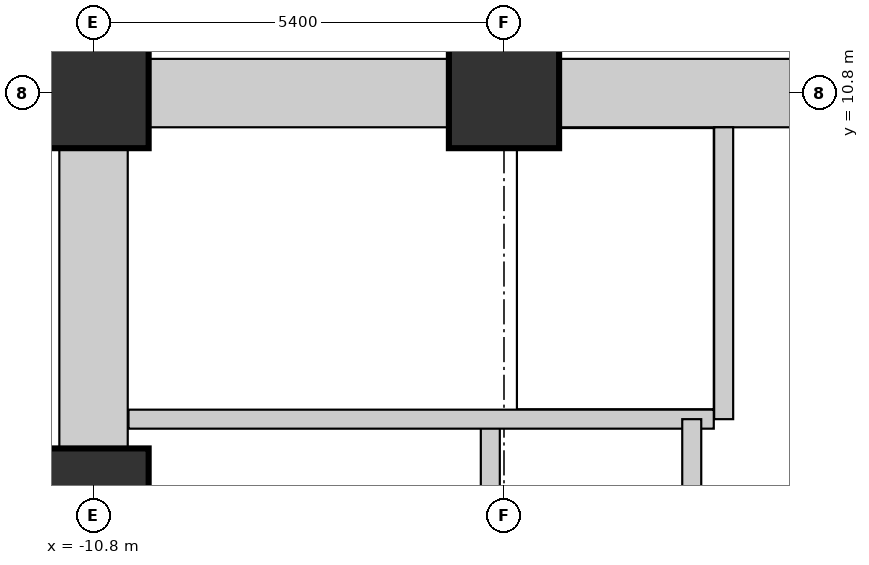
"""IFC4 building model, lengths in metres.
Left out: names, types, materials, properties, quantities, classifications, styles, units other than length and angle.
Written with IfcOpenShell. Run it as: python <this file> out.ifc"""

import sys

from ifc_helpers import new_model, si_unit, direction, frame, frame_2d, origin, origin_2d, place, context, subcontext, project, spatial, rectangle, extrude, element, fill, save


model = new_model("IFC4")
c1 = context("Model", 3, precision=1e-05, world=origin(), true_north=direction((0.0, 1.0)))
c2 = subcontext(c1, "Body", "Model", "MODEL_VIEW")
j1 = project(units=[si_unit("LENGTHUNIT", "METRE"), si_unit("PLANEANGLEUNIT", "RADIAN")], contexts=[c1])
p1 = place(None, origin())
s1 = spatial("IfcSite", under=j1, at=p1, CompositionType="ELEMENT")
p2 = place(p1, origin())
s2 = spatial("IfcBuilding", under=s1, at=p2, CompositionType="ELEMENT")
p3 = place(p2, origin())
s3 = spatial("IfcBuildingStorey", under=s2, at=p3, CompositionType="ELEMENT", Elevation=0.0)
for number, where, z_axis, x_axis in (
    (1, (-10.8, 5.4, 0.0), (0.0, 0.0, 1.0), (1.0, 0.0, 0.0)),
    (2, (-10.8, 10.8, 0.0), (0.0, 0.0, 1.0), (1.0, 0.0, 0.0)),
    (3, (-5.4, 10.8, 0.0), (0.0, 0.0, 1.0), (1.0, 0.0, 0.0)),
):
    element("IfcColumn", number, at=place(p3, frame(where, z_axis=z_axis, x_axis=x_axis)), inside=s3, PredefinedType="COLUMN", context=c2, shape_type="SweptSolid", body=[
        extrude(rectangle(XDim=1.45, YDim=1.45, at=origin_2d()), origin(), (0.0, 0.0, 1.0), 4.5),
    ])
p4 = place(p3, frame((-10.065, 10.8, 0.0), z_axis=(0.0, 0.0, 1.0), x_axis=(1.0, 0.0, 0.0)))
e4 = element("IfcWall", 4, at=p4, inside=s3, PredefinedType="SHEAR", context=c2, shape_type="SweptSolid", body=[
    extrude(rectangle(XDim=3.93, YDim=0.9, at=frame_2d((1.965, 0.0))), origin(), (0.0, 0.0, 1.0), 4.5),
])
p5 = place(p3, frame((-4.665, 10.8, 0.0), z_axis=(0.0, 0.0, 1.0), x_axis=(1.0, 0.0, 0.0)))
e5 = element("IfcWall", 5, at=p5, inside=s3, PredefinedType="SHEAR", context=c2, shape_type="SweptSolid", body=[
    extrude(rectangle(XDim=3.93, YDim=0.9, at=frame_2d((1.965, 0.0))), origin(), (0.0, 0.0, 1.0), 4.5),
])
p6 = place(p5, frame((2.58, 0.0, 0.0)))
e6 = element("IfcOpeningElement", 6, at=p6, cuts=e5, PredefinedType="OPENING", context=c2, shape_type="SweptSolid", body=[
    extrude(rectangle(XDim=1.1, YDim=2.1, at=frame_2d((0.55, 1.05))), frame((0.0, 0.46, 0.0), z_axis=(0.0, -1.0, 0.0), x_axis=(1.0, 0.0, 0.0)), (0.0, 0.0, 1.0), 0.92),
])
p7 = place(p3, frame((-10.8, 6.135, 0.0), z_axis=(0.0, 0.0, 1.0), x_axis=(0.0, 1.0, 0.0)))
e7 = element("IfcWall", 7, at=p7, inside=s3, PredefinedType="SHEAR", context=c2, shape_type="SweptSolid", body=[
    extrude(rectangle(XDim=3.93, YDim=0.9, at=frame_2d((1.965, 0.0))), origin(), (0.0, 0.0, 1.0), 4.5),
])
p8 = place(p3, frame((-5.58, 0.72, 0.0), z_axis=(0.0, 0.0, 1.0), x_axis=(0.0, 1.0, 0.0)))
e8 = element("IfcWall", 8, at=p8, inside=s3, PredefinedType="SHEAR", context=c2, shape_type="SweptSolid", body=[
    extrude(rectangle(XDim=5.79, YDim=0.25, at=frame_2d((2.895, 0.0))), origin(), (0.0, 0.0, 1.0), 4.5),
])
p9 = place(p8, frame((3.35, 0.0, 0.0)))
e9 = element("IfcOpeningElement", 9, at=p9, cuts=e8, PredefinedType="OPENING", context=c2, shape_type="SweptSolid", body=[
    extrude(rectangle(XDim=1.1, YDim=2.1, at=frame_2d((0.55, 1.05))), frame((0.0, 0.135, 0.0), z_axis=(0.0, -1.0, 0.0), x_axis=(1.0, 0.0, 0.0)), (0.0, 0.0, 1.0), 0.27),
])
p10 = place(p3, frame((-2.51, 6.51, 0.0), z_axis=(0.0, 0.0, 1.0), x_axis=(0.0, 1.0, 0.0)))
e10 = element("IfcWall", 10, at=p10, inside=s3, PredefinedType="SHEAR", context=c2, shape_type="SweptSolid", body=[
    extrude(rectangle(XDim=3.84, YDim=0.25, at=frame_2d((1.92, 0.0))), origin(), (0.0, 0.0, 1.0), 4.5),
])
p11 = place(p3, frame((-10.34, 6.51, 0.0), z_axis=(0.0, 0.0, 1.0), x_axis=(1.0, 0.0, 0.0)))
e11 = element("IfcWall", 11, at=p11, inside=s3, PredefinedType="SHEAR", context=c2, shape_type="SweptSolid", body=[
    extrude(rectangle(XDim=7.7, YDim=0.25, at=frame_2d((3.85, 0.0))), origin(), (0.0, 0.0, 1.0), 4.5),
])
p12 = place(p11, frame((0.35, 0.0, 0.0)))
e12 = element("IfcOpeningElement", 12, at=p12, cuts=e11, PredefinedType="OPENING", context=c2, shape_type="SweptSolid", body=[
    extrude(rectangle(XDim=1.1, YDim=2.1, at=frame_2d((0.55, 1.05))), frame((0.0, 0.135, 0.0), z_axis=(0.0, -1.0, 0.0), x_axis=(1.0, 0.0, 0.0)), (0.0, 0.0, 1.0), 0.27),
])
p13 = place(p3, frame((-2.93, 0.68, 0.0), z_axis=(0.0, 0.0, 1.0), x_axis=(0.0, 1.0, 0.0)))
e13 = element("IfcWall", 13, at=p13, inside=s3, PredefinedType="SHEAR", context=c2, shape_type="SweptSolid", body=[
    extrude(rectangle(XDim=5.83, YDim=0.25, at=frame_2d((2.915, 0.0))), origin(), (0.0, 0.0, 1.0), 4.5),
])
p14 = place(p13, frame((0.75, 0.0, 0.0)))
e14 = element("IfcOpeningElement", 14, at=p14, cuts=e13, PredefinedType="OPENING", context=c2, shape_type="SweptSolid", body=[
    extrude(rectangle(XDim=1.2, YDim=2.1, at=frame_2d((0.6, 1.05))), frame((0.0, 0.135, 0.0), z_axis=(0.0, -1.0, 0.0), x_axis=(1.0, 0.0, 0.0)), (0.0, 0.0, 1.0), 0.27),
])
p15 = place(p12, origin())
e15 = element("IfcDoor", 15, at=p15, inside=s3, OperationType="SINGLE_SWING_LEFT", PredefinedType="DOOR", context=c2, shape_type="SweptSolid", body=[
    extrude(rectangle(XDim=1.1, YDim=2.1, at=frame_2d((0.55, 1.05))), frame((0.0, 0.025, 0.0), z_axis=(0.0, -1.0, 0.0), x_axis=(1.0, 0.0, 0.0)), (0.0, 0.0, 1.0), 0.05),
])
fill(e12, e15)
p16 = place(p6, origin())
e16 = element("IfcDoor", 16, at=p16, inside=s3, OperationType="SINGLE_SWING_LEFT", PredefinedType="DOOR", context=c2, shape_type="SweptSolid", body=[
    extrude(rectangle(XDim=1.1, YDim=2.1, at=frame_2d((0.55, 1.05))), frame((0.0, 0.025, 0.0), z_axis=(0.0, -1.0, 0.0), x_axis=(1.0, 0.0, 0.0)), (0.0, 0.0, 1.0), 0.05),
])
fill(e6, e16)
save(model, sys.argv[1])
